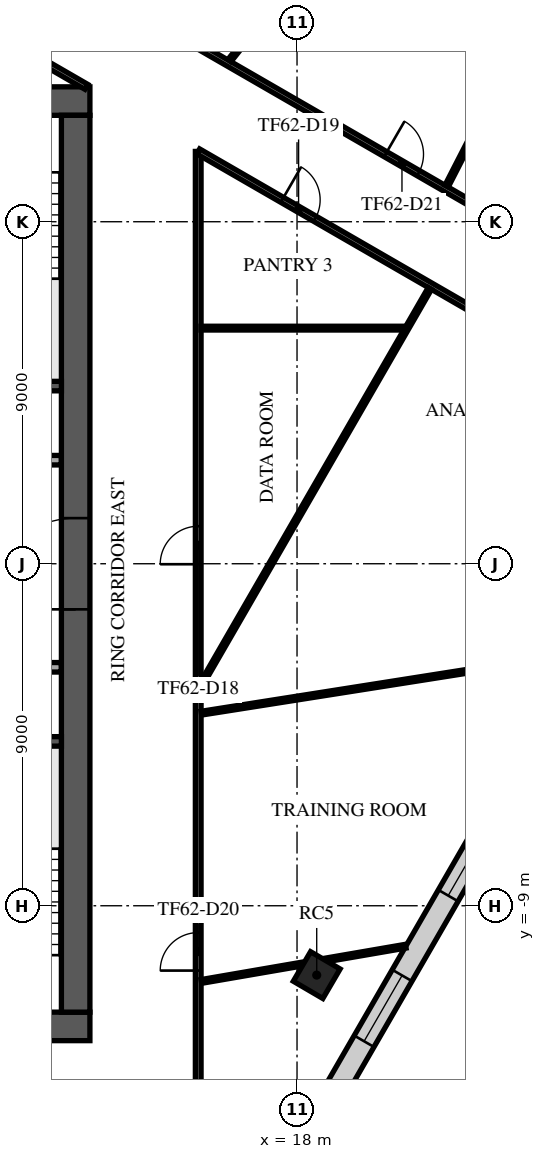
"""IFC4 building model, lengths in metres.
Left out: names, types, materials, properties, quantities, classifications, styles, units other than length and angle.
Written with IfcOpenShell. Run it as: python <this file> out.ifc"""

import sys

from ifc_helpers import new_model, si_unit, direction, frame, frame_2d, origin, origin_2d, place, context, subcontext, project, spatial, rectangle, extrude, element, fill, save


model = new_model("IFC4")
c1 = context("Model", 3, precision=1e-05, world=origin(), true_north=direction((0.0, 1.0)))
c2 = subcontext(c1, "Body", "Model", "MODEL_VIEW")
j1 = project(units=[si_unit("LENGTHUNIT", "METRE"), si_unit("PLANEANGLEUNIT", "RADIAN")], contexts=[c1])
p1 = place(None, origin())
s1 = spatial("IfcSite", under=j1, at=p1, CompositionType="ELEMENT")
p2 = place(p1, origin())
s2 = spatial("IfcBuilding", under=s1, at=p2, CompositionType="ELEMENT")
p3 = place(p2, frame((0.0, 0.0, 262.9)))
s3 = spatial("IfcBuildingStorey", under=s2, at=p3, CompositionType="ELEMENT", Elevation=262.9)
p4 = place(p3, frame((18.518, -10.825, 0.0), z_axis=(0.0, 0.0, 1.0), x_axis=(0.504643651291, 0.863327739165, 0.0)))
e1 = element("IfcColumn", 1, at=p4, inside=s3, PredefinedType="COLUMN", context=c2, shape_type="SweptSolid", body=[
    extrude(rectangle(XDim=0.9, YDim=0.9, at=origin_2d()), origin(), (0.0, 0.0, 1.0), 4.0),
])
p5 = place(p3, frame((-12.55, 12.175, 0.0), z_axis=(0.0, 0.0, 1.0), x_axis=(1.0, 0.0, 0.0)))
e2 = element("IfcWall", 2, at=p5, inside=s3, PredefinedType="SHEAR", context=c2, shape_type="SweptSolid", body=[
    extrude(rectangle(XDim=25.1, YDim=0.75, at=frame_2d((12.55, 0.0))), origin(), (0.0, 0.0, 1.0), 3.64),
])
p6 = place(p5, frame((11.35, 0.0, 0.0)))
e3 = element("IfcOpeningElement", 3, at=p6, cuts=e2, PredefinedType="OPENING", context=c2, shape_type="SweptSolid", body=[
    extrude(rectangle(XDim=2.4, YDim=2.4, at=frame_2d((1.2, 1.2))), frame((0.0, 0.385, 0.0), z_axis=(0.0, -1.0, 0.0), x_axis=(1.0, 0.0, 0.0)), (0.0, 0.0, 1.0), 0.77),
])
p7 = place(p5, frame((22.175, 0.0, 0.0)))
e4 = element("IfcOpeningElement", 4, at=p7, cuts=e2, PredefinedType="OPENING", context=c2, shape_type="SweptSolid", body=[
    extrude(rectangle(XDim=1.2, YDim=2.1, at=frame_2d((0.6, 1.05))), frame((0.0, 0.385, 0.0), z_axis=(0.0, -1.0, 0.0), x_axis=(1.0, 0.0, 0.0)), (0.0, 0.0, 1.0), 0.77),
])
p8 = place(p5, frame((1.15, 0.0, 0.0)))
e5 = element("IfcOpeningElement", 5, at=p8, cuts=e2, PredefinedType="OPENING", context=c2, shape_type="SweptSolid", body=[
    extrude(rectangle(XDim=1.0, YDim=2.1, at=frame_2d((0.5, 1.05))), frame((0.0, 0.385, 0.0), z_axis=(0.0, -1.0, 0.0), x_axis=(1.0, 0.0, 0.0)), (0.0, 0.0, 1.0), 0.77),
])
p9 = place(p3, frame((-12.55, -12.175, 0.0), z_axis=(0.0, 0.0, 1.0), x_axis=(1.0, 0.0, 0.0)))
e6 = element("IfcWall", 6, at=p9, inside=s3, PredefinedType="SHEAR", context=c2, shape_type="SweptSolid", body=[
    extrude(rectangle(XDim=25.1, YDim=0.75, at=frame_2d((12.55, 0.0))), origin(), (0.0, 0.0, 1.0), 3.64),
])
p10 = place(p9, frame((7.45, 0.0, 0.0)))
e7 = element("IfcOpeningElement", 7, at=p10, cuts=e6, PredefinedType="OPENING", context=c2, shape_type="SweptSolid", body=[
    extrude(rectangle(XDim=2.0, YDim=2.1, at=frame_2d((1.0, 1.05))), frame((0.0, 0.385, 0.0), z_axis=(0.0, -1.0, 0.0), x_axis=(1.0, 0.0, 0.0)), (0.0, 0.0, 1.0), 0.77),
])
p11 = place(p9, frame((17.575, 0.0, 0.0)))
e8 = element("IfcOpeningElement", 8, at=p11, cuts=e6, PredefinedType="OPENING", context=c2, shape_type="SweptSolid", body=[
    extrude(rectangle(XDim=1.2, YDim=2.1, at=frame_2d((0.6, 1.05))), frame((0.0, 0.385, 0.0), z_axis=(0.0, -1.0, 0.0), x_axis=(1.0, 0.0, 0.0)), (0.0, 0.0, 1.0), 0.77),
])
p12 = place(p9, frame((1.725, 0.0, 0.0)))
e9 = element("IfcOpeningElement", 9, at=p12, cuts=e6, PredefinedType="OPENING", context=c2, shape_type="SweptSolid", body=[
    extrude(rectangle(XDim=1.2, YDim=2.1, at=frame_2d((0.6, 1.05))), frame((0.0, 0.385, 0.0), z_axis=(0.0, -1.0, 0.0), x_axis=(1.0, 0.0, 0.0)), (0.0, 0.0, 1.0), 0.77),
])
p13 = place(p9, frame((22.175, 0.0, 0.0)))
e10 = element("IfcOpeningElement", 10, at=p13, cuts=e6, PredefinedType="OPENING", context=c2, shape_type="SweptSolid", body=[
    extrude(rectangle(XDim=1.2, YDim=2.1, at=frame_2d((0.6, 1.05))), frame((0.0, 0.385, 0.0), z_axis=(0.0, -1.0, 0.0), x_axis=(1.0, 0.0, 0.0)), (0.0, 0.0, 1.0), 0.77),
])
p14 = place(p3, frame((12.175, -11.8, 0.0), z_axis=(0.0, 0.0, 1.0), x_axis=(0.0, 1.0, 0.0)))
e11 = element("IfcWall", 11, at=p14, inside=s3, PredefinedType="SHEAR", context=c2, shape_type="SweptSolid", body=[
    extrude(rectangle(XDim=23.6, YDim=0.75, at=frame_2d((11.8, 0.0))), origin(), (0.0, 0.0, 1.0), 3.64),
])
p15 = place(p14, frame((10.6, 0.0, 0.0)))
e12 = element("IfcOpeningElement", 12, at=p15, cuts=e11, PredefinedType="OPENING", context=c2, shape_type="SweptSolid", body=[
    extrude(rectangle(XDim=2.4, YDim=2.4, at=frame_2d((1.2, 1.2))), frame((0.0, 0.385, 0.0), z_axis=(0.0, -1.0, 0.0), x_axis=(1.0, 0.0, 0.0)), (0.0, 0.0, 1.0), 0.77),
])
for number, where, z_axis, x_axis in (
    (13, (8.65, 4.675, 0.0), (0.0, 0.0, 1.0), (1.0, 0.0, 0.0)),
    (14, (8.65, -4.675, 0.0), (0.0, 0.0, 1.0), (1.0, 0.0, 0.0)),
):
    element("IfcWall", number, at=place(p3, frame(where, z_axis=z_axis, x_axis=x_axis)), inside=s3, PredefinedType="SOLIDWALL", context=c2, shape_type="SweptSolid", body=[
        extrude(rectangle(XDim=3.15, YDim=0.25, at=frame_2d((1.575, 0.0))), origin(), (0.0, 0.0, 1.0), 3.64),
    ])
p16 = place(p3, frame((5.63, -2.725, 0.0), z_axis=(0.0, 0.0, 1.0), x_axis=(1.0, 0.0, 0.0)))
e15 = element("IfcWall", 15, at=p16, inside=s3, PredefinedType="PARTITIONING", context=c2, shape_type="SweptSolid", body=[
    extrude(rectangle(XDim=6.165, YDim=0.25, at=frame_2d((3.083, 0.0))), origin(), (0.0, 0.0, 1.0), 3.64),
])
p17 = place(p16, frame((0.745, 0.0, 0.0)))
e16 = element("IfcOpeningElement", 16, at=p17, cuts=e15, PredefinedType="OPENING", context=c2, shape_type="SweptSolid", body=[
    extrude(rectangle(XDim=1.0, YDim=2.1, at=frame_2d((0.5, 1.05))), frame((0.0, 0.135, 0.0), z_axis=(0.0, -1.0, 0.0), x_axis=(1.0, 0.0, 0.0)), (0.0, 0.0, 1.0), 0.27),
])
p18 = place(p16, frame((3.92, 0.0, 0.0)))
e17 = element("IfcOpeningElement", 17, at=p18, cuts=e15, PredefinedType="OPENING", context=c2, shape_type="SweptSolid", body=[
    extrude(rectangle(XDim=0.9, YDim=2.1, at=frame_2d((0.45, 1.05))), frame((0.0, 0.135, 0.0), z_axis=(0.0, -1.0, 0.0), x_axis=(1.0, 0.0, 0.0)), (0.0, 0.0, 1.0), 0.27),
])
p19 = place(p3, frame((-11.795, 2.725, 0.0), z_axis=(0.0, 0.0, 1.0), x_axis=(1.0, 0.0, 0.0)))
e18 = element("IfcWall", 18, at=p19, inside=s3, PredefinedType="PARTITIONING", context=c2, shape_type="SweptSolid", body=[
    extrude(rectangle(XDim=23.59, YDim=0.25, at=frame_2d((11.795, 0.0))), origin(), (0.0, 0.0, 1.0), 3.64),
])
p20 = place(p19, frame((21.345, 0.0, 0.0)))
e19 = element("IfcOpeningElement", 19, at=p20, cuts=e18, PredefinedType="OPENING", context=c2, shape_type="SweptSolid", body=[
    extrude(rectangle(XDim=0.9, YDim=2.1, at=frame_2d((0.45, 1.05))), frame((0.0, 0.135, 0.0), z_axis=(0.0, -1.0, 0.0), x_axis=(1.0, 0.0, 0.0)), (0.0, 0.0, 1.0), 0.27),
])
p21 = place(p19, frame((1.345, 0.0, 0.0)))
e20 = element("IfcOpeningElement", 20, at=p21, cuts=e18, PredefinedType="OPENING", context=c2, shape_type="SweptSolid", body=[
    extrude(rectangle(XDim=0.9, YDim=2.1, at=frame_2d((0.45, 1.05))), frame((0.0, 0.135, 0.0), z_axis=(0.0, -1.0, 0.0), x_axis=(1.0, 0.0, 0.0)), (0.0, 0.0, 1.0), 0.27),
])
p22 = place(p19, frame((4.42, 0.0, 0.0)))
e21 = element("IfcOpeningElement", 21, at=p22, cuts=e18, PredefinedType="OPENING", context=c2, shape_type="SweptSolid", body=[
    extrude(rectangle(XDim=1.0, YDim=2.1, at=frame_2d((0.5, 1.05))), frame((0.0, 0.135, 0.0), z_axis=(0.0, -1.0, 0.0), x_axis=(1.0, 0.0, 0.0)), (0.0, 0.0, 1.0), 0.27),
])
p23 = place(p19, frame((9.82, 0.0, 0.0)))
e22 = element("IfcOpeningElement", 22, at=p23, cuts=e18, PredefinedType="OPENING", context=c2, shape_type="SweptSolid", body=[
    extrude(rectangle(XDim=1.2, YDim=2.1, at=frame_2d((0.6, 1.05))), frame((0.0, 0.135, 0.0), z_axis=(0.0, -1.0, 0.0), x_axis=(1.0, 0.0, 0.0)), (0.0, 0.0, 1.0), 0.27),
])
p24 = place(p3, frame((8.094, -32.782, 0.0), z_axis=(0.0, 0.0, 1.0), x_axis=(0.499997945818, 0.866026589763, 0.0)))
e23 = element("IfcWall", 23, at=p24, inside=s3, PredefinedType="STANDARD", context=c2, shape_type="SweptSolid", body=[
    extrude(rectangle(XDim=48.686, YDim=0.6, at=frame_2d((24.343, 0.0))), origin(), (0.0, 0.0, 1.0), 3.64),
])
p25 = place(p24, frame((1.213, 0.0, 0.9)))
e24 = element("IfcOpeningElement", 24, at=p25, cuts=e23, PredefinedType="OPENING", context=c2, shape_type="SweptSolid", body=[
    extrude(rectangle(XDim=2.0, YDim=2.1, at=frame_2d((1.0, 1.05))), frame((0.0, 0.31, 0.0), z_axis=(0.0, -1.0, 0.0), x_axis=(1.0, 0.0, 0.0)), (0.0, 0.0, 1.0), 0.62),
])
p26 = place(p24, frame((5.639, 0.0, 0.9)))
e25 = element("IfcOpeningElement", 25, at=p26, cuts=e23, PredefinedType="OPENING", context=c2, shape_type="SweptSolid", body=[
    extrude(rectangle(XDim=2.0, YDim=2.1, at=frame_2d((1.0, 1.05))), frame((0.0, 0.31, 0.0), z_axis=(0.0, -1.0, 0.0), x_axis=(1.0, 0.0, 0.0)), (0.0, 0.0, 1.0), 0.62),
])
p27 = place(p24, frame((10.065, 0.0, 0.9)))
e26 = element("IfcOpeningElement", 26, at=p27, cuts=e23, PredefinedType="OPENING", context=c2, shape_type="SweptSolid", body=[
    extrude(rectangle(XDim=2.0, YDim=2.1, at=frame_2d((1.0, 1.05))), frame((0.0, 0.31, 0.0), z_axis=(0.0, -1.0, 0.0), x_axis=(1.0, 0.0, 0.0)), (0.0, 0.0, 1.0), 0.62),
])
p28 = place(p24, frame((14.491, 0.0, 0.9)))
e27 = element("IfcOpeningElement", 27, at=p28, cuts=e23, PredefinedType="OPENING", context=c2, shape_type="SweptSolid", body=[
    extrude(rectangle(XDim=2.0, YDim=2.1, at=frame_2d((1.0, 1.05))), frame((0.0, 0.31, 0.0), z_axis=(0.0, -1.0, 0.0), x_axis=(1.0, 0.0, 0.0)), (0.0, 0.0, 1.0), 0.62),
])
p29 = place(p24, frame((18.917, 0.0, 0.9)))
e28 = element("IfcOpeningElement", 28, at=p29, cuts=e23, PredefinedType="OPENING", context=c2, shape_type="SweptSolid", body=[
    extrude(rectangle(XDim=2.0, YDim=2.1, at=frame_2d((1.0, 1.05))), frame((0.0, 0.31, 0.0), z_axis=(0.0, -1.0, 0.0), x_axis=(1.0, 0.0, 0.0)), (0.0, 0.0, 1.0), 0.62),
])
p30 = place(p24, frame((23.343, 0.0, 0.9)))
e29 = element("IfcOpeningElement", 29, at=p30, cuts=e23, PredefinedType="OPENING", context=c2, shape_type="SweptSolid", body=[
    extrude(rectangle(XDim=2.0, YDim=2.1, at=frame_2d((1.0, 1.05))), frame((0.0, 0.31, 0.0), z_axis=(0.0, -1.0, 0.0), x_axis=(1.0, 0.0, 0.0)), (0.0, 0.0, 1.0), 0.62),
])
p31 = place(p24, frame((27.769, 0.0, 0.9)))
e30 = element("IfcOpeningElement", 30, at=p31, cuts=e23, PredefinedType="OPENING", context=c2, shape_type="SweptSolid", body=[
    extrude(rectangle(XDim=2.0, YDim=2.1, at=frame_2d((1.0, 1.05))), frame((0.0, 0.31, 0.0), z_axis=(0.0, -1.0, 0.0), x_axis=(1.0, 0.0, 0.0)), (0.0, 0.0, 1.0), 0.62),
])
p32 = place(p24, frame((32.195, 0.0, 0.9)))
e31 = element("IfcOpeningElement", 31, at=p32, cuts=e23, PredefinedType="OPENING", context=c2, shape_type="SweptSolid", body=[
    extrude(rectangle(XDim=2.0, YDim=2.1, at=frame_2d((1.0, 1.05))), frame((0.0, 0.31, 0.0), z_axis=(0.0, -1.0, 0.0), x_axis=(1.0, 0.0, 0.0)), (0.0, 0.0, 1.0), 0.62),
])
p33 = place(p24, frame((36.621, 0.0, 0.9)))
e32 = element("IfcOpeningElement", 32, at=p33, cuts=e23, PredefinedType="OPENING", context=c2, shape_type="SweptSolid", body=[
    extrude(rectangle(XDim=2.0, YDim=2.1, at=frame_2d((1.0, 1.05))), frame((0.0, 0.31, 0.0), z_axis=(0.0, -1.0, 0.0), x_axis=(1.0, 0.0, 0.0)), (0.0, 0.0, 1.0), 0.62),
])
p34 = place(p24, frame((41.047, 0.0, 0.9)))
e33 = element("IfcOpeningElement", 33, at=p34, cuts=e23, PredefinedType="OPENING", context=c2, shape_type="SweptSolid", body=[
    extrude(rectangle(XDim=2.0, YDim=2.1, at=frame_2d((1.0, 1.05))), frame((0.0, 0.31, 0.0), z_axis=(0.0, -1.0, 0.0), x_axis=(1.0, 0.0, 0.0)), (0.0, 0.0, 1.0), 0.62),
])
p35 = place(p24, frame((45.473, 0.0, 0.9)))
e34 = element("IfcOpeningElement", 34, at=p35, cuts=e23, PredefinedType="OPENING", context=c2, shape_type="SweptSolid", body=[
    extrude(rectangle(XDim=2.0, YDim=2.1, at=frame_2d((1.0, 1.05))), frame((0.0, 0.31, 0.0), z_axis=(0.0, -1.0, 0.0), x_axis=(1.0, 0.0, 0.0)), (0.0, 0.0, 1.0), 0.62),
])
p36 = place(p3, frame((-7.247, 26.698, 0.0), z_axis=(0.0, 0.0, 1.0), x_axis=(0.866022442497, -0.500005129065, 0.0)))
e35 = element("IfcWall", 35, at=p36, inside=s3, PredefinedType="PARTITIONING", context=c2, shape_type="SweptSolid", body=[
    extrude(rectangle(XDim=39.325, YDim=0.15, at=frame_2d((19.662, 0.0))), origin(), (0.0, 0.0, 1.0), 3.04),
])
p37 = place(p36, frame((15.654, 0.0, 0.0)))
e36 = element("IfcOpeningElement", 36, at=p37, cuts=e35, PredefinedType="OPENING", context=c2, shape_type="SweptSolid", body=[
    extrude(rectangle(XDim=1.0, YDim=2.1, at=frame_2d((0.5, 1.05))), frame((0.0, 0.085, 0.0), z_axis=(0.0, -1.0, 0.0), x_axis=(1.0, 0.0, 0.0)), (0.0, 0.0, 1.0), 0.17),
])
p38 = place(p36, frame((23.442, 0.0, 0.0)))
e37 = element("IfcOpeningElement", 37, at=p38, cuts=e35, PredefinedType="OPENING", context=c2, shape_type="SweptSolid", body=[
    extrude(rectangle(XDim=1.0, YDim=2.1, at=frame_2d((0.5, 1.05))), frame((0.0, 0.085, 0.0), z_axis=(0.0, -1.0, 0.0), x_axis=(1.0, 0.0, 0.0)), (0.0, 0.0, 1.0), 0.17),
])
p39 = place(p36, frame((31.841, 0.0, 0.0)))
e38 = element("IfcOpeningElement", 38, at=p39, cuts=e35, PredefinedType="OPENING", context=c2, shape_type="SweptSolid", body=[
    extrude(rectangle(XDim=1.0, YDim=2.1, at=frame_2d((0.5, 1.05))), frame((0.0, 0.085, 0.0), z_axis=(0.0, -1.0, 0.0), x_axis=(1.0, 0.0, 0.0)), (0.0, 0.0, 1.0), 0.17),
])
p40 = place(p36, frame((36.955, 0.0, 0.0)))
e39 = element("IfcOpeningElement", 39, at=p40, cuts=e35, PredefinedType="OPENING", context=c2, shape_type="SweptSolid", body=[
    extrude(rectangle(XDim=1.0, YDim=2.1, at=frame_2d((0.5, 1.05))), frame((0.0, 0.085, 0.0), z_axis=(0.0, -1.0, 0.0), x_axis=(1.0, 0.0, 0.0)), (0.0, 0.0, 1.0), 0.17),
])
p41 = place(p3, frame((5.15, 16.769, 0.0), z_axis=(0.0, 0.0, 1.0), x_axis=(0.866010168016, -0.500026388196, 0.0)))
e40 = element("IfcWall", 40, at=p41, inside=s3, PredefinedType="PARTITIONING", context=c2, shape_type="SweptSolid", body=[
    extrude(rectangle(XDim=8.437, YDim=0.15, at=frame_2d((4.218, 0.0))), origin(), (0.0, 0.0, 1.0), 3.24),
])
p42 = place(p41, frame((3.3, 0.0, 0.0)))
e41 = element("IfcOpeningElement", 41, at=p42, cuts=e40, PredefinedType="OPENING", context=c2, shape_type="SweptSolid", body=[
    extrude(rectangle(XDim=1.0, YDim=2.1, at=frame_2d((0.5, 1.05))), frame((0.0, 0.085, 0.0), z_axis=(0.0, -1.0, 0.0), x_axis=(1.0, 0.0, 0.0)), (0.0, 0.0, 1.0), 0.17),
])
p43 = place(p3, frame((15.4, -15.325, 0.0), z_axis=(0.0, 0.0, 1.0), x_axis=(0.0, 1.0, 0.0)))
e42 = element("IfcWall", 42, at=p43, inside=s3, PredefinedType="PARTITIONING", context=c2, shape_type="SweptSolid", body=[
    extrude(rectangle(XDim=26.175, YDim=0.15, at=frame_2d((13.087, 0.0))), origin(), (0.0, 0.0, 1.0), 3.24),
])
p44 = place(p43, frame((15.312, 0.0, 0.0)))
e43 = element("IfcOpeningElement", 43, at=p44, cuts=e42, PredefinedType="OPENING", context=c2, shape_type="SweptSolid", body=[
    extrude(rectangle(XDim=1.0, YDim=2.1, at=frame_2d((0.5, 1.05))), frame((0.0, 0.085, 0.0), z_axis=(0.0, -1.0, 0.0), x_axis=(1.0, 0.0, 0.0)), (0.0, 0.0, 1.0), 0.17),
])
p45 = place(p43, frame((4.619, 0.0, 0.0)))
e44 = element("IfcOpeningElement", 44, at=p45, cuts=e42, PredefinedType="OPENING", context=c2, shape_type="SweptSolid", body=[
    extrude(rectangle(XDim=1.0, YDim=2.1, at=frame_2d((0.5, 1.05))), frame((0.0, 0.085, 0.0), z_axis=(0.0, -1.0, 0.0), x_axis=(1.0, 0.0, 0.0)), (0.0, 0.0, 1.0), 0.17),
])
p46 = place(p3, frame((15.4, 10.851, 0.0), z_axis=(0.0, 0.0, 1.0), x_axis=(0.865993826089, -0.500054690184, 0.0)))
e45 = element("IfcWall", 45, at=p46, inside=s3, PredefinedType="PARTITIONING", context=c2, shape_type="SweptSolid", body=[
    extrude(rectangle(XDim=11.789, YDim=0.15, at=frame_2d((5.895, 0.0))), origin(), (0.0, 0.0, 1.0), 3.04),
])
p47 = place(p46, frame((2.55, 0.0, 0.0)))
e46 = element("IfcOpeningElement", 46, at=p47, cuts=e45, PredefinedType="OPENING", context=c2, shape_type="SweptSolid", body=[
    extrude(rectangle(XDim=1.0, YDim=2.1, at=frame_2d((0.5, 1.05))), frame((0.0, 0.085, 0.0), z_axis=(0.0, -1.0, 0.0), x_axis=(1.0, 0.0, 0.0)), (0.0, 0.0, 1.0), 0.17),
])
p48 = place(p3, frame((15.475, 6.2, 0.0), z_axis=(0.0, 0.0, 1.0), x_axis=(1.0, 0.0, 0.0)))
e47 = element("IfcWall", 47, at=p48, inside=s3, PredefinedType="PARTITIONING", context=c2, shape_type="SweptSolid", body=[
    extrude(rectangle(XDim=5.33, YDim=0.1, at=frame_2d((2.665, 0.0))), origin(), (0.0, 0.0, 1.0), 3.64),
])
p49 = place(p3, frame((15.483, -10.992, 0.0), z_axis=(0.0, 0.0, 1.0), x_axis=(0.98545132529, 0.169957893267, 0.0)))
e48 = element("IfcWall", 48, at=p49, inside=s3, PredefinedType="PARTITIONING", context=c2, shape_type="SweptSolid", body=[
    extrude(rectangle(XDim=2.726, YDim=0.1, at=frame_2d((1.363, 0.0))), origin(), (0.0, 0.0, 1.0), 3.12),
])
p50 = place(p3, frame((15.483, -3.932, 0.0), z_axis=(0.0, 0.0, 1.0), x_axis=(0.987819108506, 0.155606583636, 0.0)))
e49 = element("IfcWall", 49, at=p50, inside=s3, PredefinedType="PARTITIONING", context=c2, shape_type="SweptSolid", body=[
    extrude(rectangle(XDim=9.932, YDim=0.1, at=frame_2d((4.966, 0.0))), origin(), (0.0, 0.0, 1.0), 3.04),
])
p51 = place(p3, frame((15.518, -3.108, 0.0), z_axis=(0.0, 0.0, 1.0), x_axis=(0.499989387739, 0.866031530689, 0.0)))
e50 = element("IfcWall", 50, at=p51, inside=s3, PredefinedType="PARTITIONING", context=c2, shape_type="SweptSolid", body=[
    extrude(rectangle(XDim=11.955, YDim=0.1, at=frame_2d((5.978, 0.0))), origin(), (0.0, 0.0, 1.0), 3.24),
])
p52 = place(p3, frame((16.223, 13.242, 0.0), z_axis=(0.0, 0.0, 1.0), x_axis=(0.622346910835, 0.78274154264, 0.0)))
e51 = element("IfcWall", 51, at=p52, inside=s3, PredefinedType="PARTITIONING", context=c2, shape_type="SweptSolid", body=[
    extrude(rectangle(XDim=9.927, YDim=0.1, at=frame_2d((4.964, 0.0))), origin(), (0.0, 0.0, 1.0), 3.04),
])
p53 = place(p3, frame((18.735, -10.431, 0.0), z_axis=(0.0, 0.0, 1.0), x_axis=(0.985438538962, 0.170032014419, 0.0)))
e52 = element("IfcWall", 52, at=p53, inside=s3, PredefinedType="PARTITIONING", context=c2, shape_type="SweptSolid", body=[
    extrude(rectangle(XDim=2.157, YDim=0.1, at=frame_2d((1.078, 0.0))), origin(), (0.0, 0.0, 1.0), 3.04),
])
p54 = place(p3, frame((21.936, 9.938, 0.0), z_axis=(0.0, 0.0, 1.0), x_axis=(0.456562052213, 0.889691571545, 0.0)))
e53 = element("IfcWall", 53, at=p54, inside=s3, PredefinedType="PARTITIONING", context=c2, shape_type="SweptSolid", body=[
    extrude(rectangle(XDim=9.835, YDim=0.1, at=frame_2d((4.918, 0.0))), origin(), (0.0, 0.0, 1.0), 3.04),
])
p55 = place(p15, origin())
e54 = element("IfcDoor", 54, at=p55, inside=s3, OperationType="SINGLE_SWING_LEFT", PredefinedType="DOOR", context=c2, shape_type="SweptSolid", body=[
    extrude(rectangle(XDim=2.4, YDim=2.4, at=frame_2d((1.2, 1.2))), frame((0.0, 0.025, 0.0), z_axis=(0.0, -1.0, 0.0), x_axis=(1.0, 0.0, 0.0)), (0.0, 0.0, 1.0), 0.05),
])
fill(e12, e54)
p56 = place(p30, origin())
e55 = element("IfcWindow", 55, at=p56, inside=s3, PartitioningType="SINGLE_PANEL", PredefinedType="WINDOW", context=c2, shape_type="SweptSolid", body=[
    extrude(rectangle(XDim=2.0, YDim=2.1, at=frame_2d((1.0, 1.05))), frame((0.0, 0.03, 0.0), z_axis=(0.0, -1.0, 0.0), x_axis=(1.0, 0.0, 0.0)), (0.0, 0.0, 1.0), 0.06),
])
fill(e29, e55)
p57 = place(p31, origin())
e56 = element("IfcWindow", 56, at=p57, inside=s3, PartitioningType="SINGLE_PANEL", PredefinedType="WINDOW", context=c2, shape_type="SweptSolid", body=[
    extrude(rectangle(XDim=2.0, YDim=2.1, at=frame_2d((1.0, 1.05))), frame((0.0, 0.03, 0.0), z_axis=(0.0, -1.0, 0.0), x_axis=(1.0, 0.0, 0.0)), (0.0, 0.0, 1.0), 0.06),
])
fill(e30, e56)
p58 = place(p44, frame((1.0, 0.0, 0.0), z_axis=(0.0, 0.0, 1.0), x_axis=(-1.0, 0.0, 0.0)))
e57 = element("IfcDoor", 57, at=p58, inside=s3, OperationType="SINGLE_SWING_LEFT", PredefinedType="DOOR", context=c2, shape_type="SweptSolid", body=[
    extrude(rectangle(XDim=1.0, YDim=2.1, at=frame_2d((0.5, 1.05))), frame((0.0, 0.025, 0.0), z_axis=(0.0, -1.0, 0.0), x_axis=(1.0, 0.0, 0.0)), (0.0, 0.0, 1.0), 0.05),
])
fill(e43, e57)
p59 = place(p47, frame((1.0, 0.0, 0.0), z_axis=(0.0, 0.0, 1.0), x_axis=(-1.0, 0.0, 0.0)))
e58 = element("IfcDoor", 58, at=p59, inside=s3, OperationType="SINGLE_SWING_LEFT", PredefinedType="DOOR", context=c2, shape_type="SweptSolid", body=[
    extrude(rectangle(XDim=1.0, YDim=2.1, at=frame_2d((0.5, 1.05))), frame((0.0, 0.025, 0.0), z_axis=(0.0, -1.0, 0.0), x_axis=(1.0, 0.0, 0.0)), (0.0, 0.0, 1.0), 0.05),
])
fill(e46, e58)
p60 = place(p45, frame((1.0, 0.0, 0.0), z_axis=(0.0, 0.0, 1.0), x_axis=(-1.0, 0.0, 0.0)))
e59 = element("IfcDoor", 59, at=p60, inside=s3, OperationType="SINGLE_SWING_LEFT", PredefinedType="DOOR", context=c2, shape_type="SweptSolid", body=[
    extrude(rectangle(XDim=1.0, YDim=2.1, at=frame_2d((0.5, 1.05))), frame((0.0, 0.025, 0.0), z_axis=(0.0, -1.0, 0.0), x_axis=(1.0, 0.0, 0.0)), (0.0, 0.0, 1.0), 0.05),
])
fill(e44, e59)
p61 = place(p39, origin())
e60 = element("IfcDoor", 60, at=p61, inside=s3, OperationType="SINGLE_SWING_RIGHT", PredefinedType="DOOR", context=c2, shape_type="SweptSolid", body=[
    extrude(rectangle(XDim=1.0, YDim=2.1, at=frame_2d((0.5, 1.05))), frame((0.0, 0.025, 0.0), z_axis=(0.0, -1.0, 0.0), x_axis=(1.0, 0.0, 0.0)), (0.0, 0.0, 1.0), 0.05),
])
fill(e38, e60)
save(model, sys.argv[1])
